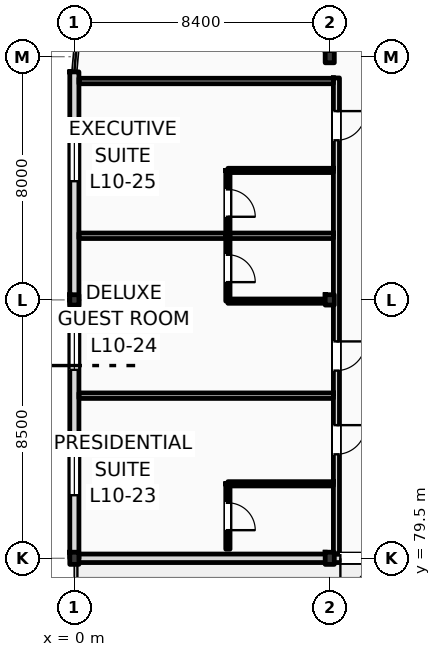
"""IFC4 building model, lengths in metres.
Left out: names, types, materials, properties, quantities, classifications, styles, units other than length and angle.
Written with IfcOpenShell. Run it as: python <this file> out.ifc"""

import sys

from ifc_helpers import new_model, si_unit, direction, frame, frame_2d, origin, origin_2d, place, context, subcontext, project, spatial, rectangle, i_section, extrude, element, fill, save


model = new_model("IFC4")
c1 = context("Model", 3, precision=1e-05, world=origin(), true_north=direction((0.0, 1.0)))
c2 = subcontext(c1, "Body", "Model", "MODEL_VIEW")
j1 = project(units=[si_unit("LENGTHUNIT", "METRE"), si_unit("PLANEANGLEUNIT", "RADIAN")], contexts=[c1])
p1 = place(None, origin())
s1 = spatial("IfcSite", under=j1, at=p1, CompositionType="ELEMENT")
p2 = place(p1, origin())
s2 = spatial("IfcBuilding", under=s1, at=p2, CompositionType="ELEMENT")
p3 = place(p2, frame((0.0, 0.0, 42.6)))
s3 = spatial("IfcBuildingStorey", under=s2, at=p3, CompositionType="ELEMENT", Elevation=42.6)
p4 = place(p3, frame((0.0, 79.5, 0.0), z_axis=(0.0, 0.0, 1.0), x_axis=(1.0, 0.0, 0.0)))
e1 = element("IfcColumn", 1, at=p4, inside=s3, PredefinedType="COLUMN", context=c2, shape_type="SweptSolid", body=[
    extrude(i_section(OverallWidth=0.3, OverallDepth=0.4, WebThickness=0.013, FlangeThickness=0.024, FilletRadius=0.027, at=origin_2d()), origin(), (0.0, 0.0, 1.0), 4.2),
])
p5 = place(p3, frame((0.0, 88.0, 0.0), z_axis=(0.0, 0.0, 1.0), x_axis=(1.0, 0.0, 0.0)))
e2 = element("IfcColumn", 2, at=p5, inside=s3, PredefinedType="COLUMN", context=c2, shape_type="SweptSolid", body=[
    extrude(i_section(OverallWidth=0.3, OverallDepth=0.34, WebThickness=0.012, FlangeThickness=0.021, FilletRadius=0.027, at=origin_2d()), origin(), (0.0, 0.0, 1.0), 4.2),
])
p6 = place(p3, frame((8.4, 79.5, 0.0), z_axis=(0.0, 0.0, 1.0), x_axis=(1.0, 0.0, 0.0)))
e3 = element("IfcColumn", 3, at=p6, inside=s3, PredefinedType="COLUMN", context=c2, shape_type="SweptSolid", body=[
    extrude(i_section(OverallWidth=0.3, OverallDepth=0.4, WebThickness=0.013, FlangeThickness=0.024, FilletRadius=0.027, at=origin_2d()), origin(), (0.0, 0.0, 1.0), 4.2),
])
p7 = place(p3, frame((8.4, 88.0, 0.0), z_axis=(0.0, 0.0, 1.0), x_axis=(1.0, 0.0, 0.0)))
e4 = element("IfcColumn", 4, at=p7, inside=s3, PredefinedType="COLUMN", context=c2, shape_type="SweptSolid", body=[
    extrude(i_section(OverallWidth=0.3, OverallDepth=0.34, WebThickness=0.012, FlangeThickness=0.021, FilletRadius=0.027, at=origin_2d()), origin(), (0.0, 0.0, 1.0), 4.2),
])
p8 = place(p3, frame((8.4, 96.0, 0.0), z_axis=(0.0, 0.0, 1.0), x_axis=(1.0, 0.0, 0.0)))
e5 = element("IfcColumn", 5, at=p8, inside=s3, PredefinedType="COLUMN", context=c2, shape_type="SweptSolid", body=[
    extrude(i_section(OverallWidth=0.3, OverallDepth=0.4, WebThickness=0.013, FlangeThickness=0.024, FilletRadius=0.027, at=origin_2d()), origin(), (0.0, 0.0, 1.0), 4.2),
])
p9 = place(p3, frame((0.0, 79.5, 0.0), z_axis=(0.0, 0.0, 1.0), x_axis=(0.0, 1.0, 0.0)))
e6 = element("IfcWall", 6, at=p9, inside=s3, PredefinedType="STANDARD", context=c2, shape_type="SweptSolid", body=[
    extrude(rectangle(XDim=8.5, YDim=0.3, at=frame_2d((4.25, 0.0))), origin(), (0.0, 0.0, 1.0), 3.57),
])
p10 = place(p9, frame((2.075, 0.0, 0.9)))
e7 = element("IfcOpeningElement", 7, at=p10, cuts=e6, PredefinedType="OPENING", context=c2, shape_type="SweptSolid", body=[
    extrude(rectangle(XDim=1.5, YDim=2.49, at=frame_2d((0.75, 1.245))), frame((0.0, 0.16, 0.0), z_axis=(0.0, -1.0, 0.0), x_axis=(1.0, 0.0, 0.0)), (0.0, 0.0, 1.0), 0.32),
])
p11 = place(p9, frame((6.2, 0.0, 0.9)))
e8 = element("IfcOpeningElement", 8, at=p11, cuts=e6, PredefinedType="OPENING", context=c2, shape_type="SweptSolid", body=[
    extrude(rectangle(XDim=1.5, YDim=2.49, at=frame_2d((0.75, 1.245))), frame((0.0, 0.16, 0.0), z_axis=(0.0, -1.0, 0.0), x_axis=(1.0, 0.0, 0.0)), (0.0, 0.0, 1.0), 0.32),
])
p12 = place(p3, frame((0.0, 88.0, 0.0), z_axis=(0.0, 0.0, 1.0), x_axis=(0.0, 1.0, 0.0)))
e9 = element("IfcWall", 9, at=p12, inside=s3, PredefinedType="STANDARD", context=c2, shape_type="SweptSolid", body=[
    extrude(rectangle(XDim=7.5, YDim=0.3, at=frame_2d((3.75, 0.0))), origin(), (0.0, 0.0, 1.0), 3.94),
])
p13 = place(p12, frame((3.904, 0.0, 0.9)))
e10 = element("IfcOpeningElement", 10, at=p13, cuts=e9, PredefinedType="OPENING", context=c2, shape_type="SweptSolid", body=[
    extrude(rectangle(XDim=1.5, YDim=2.86, at=frame_2d((0.75, 1.43))), frame((0.0, 0.16, 0.0), z_axis=(0.0, -1.0, 0.0), x_axis=(1.0, 0.0, 0.0)), (0.0, 0.0, 1.0), 0.32),
])
p14 = place(p3, frame((0.0, 79.5, 0.0), z_axis=(0.0, 0.0, 1.0), x_axis=(1.0, 0.0, 0.0)))
e11 = element("IfcWall", 11, at=p14, inside=s3, PredefinedType="STANDARD", context=c2, shape_type="SweptSolid", body=[
    extrude(rectangle(XDim=25.2, YDim=0.28, at=frame_2d((12.6, 0.0))), origin(), (0.0, 0.0, 1.0), 3.38),
])
p15 = place(p14, frame((8.75, 0.0, 0.0)))
e12 = element("IfcOpeningElement", 12, at=p15, cuts=e11, PredefinedType="OPENING", context=c2, shape_type="SweptSolid", body=[
    extrude(rectangle(XDim=1.8, YDim=2.4, at=frame_2d((0.9, 1.2))), frame((0.0, 0.15, 0.0), z_axis=(0.0, -1.0, 0.0), x_axis=(1.0, 0.0, 0.0)), (0.0, 0.0, 1.0), 0.3),
])
p16 = place(p3, frame((8.62, 79.64, 0.0), z_axis=(0.0, 0.0, 1.0), x_axis=(0.0, 1.0, 0.0)))
e13 = element("IfcWall", 13, at=p16, inside=s3, PredefinedType="PARTITIONING", context=c2, shape_type="SweptSolid", body=[
    extrude(rectangle(XDim=15.66, YDim=0.2, at=frame_2d((7.83, 0.0))), origin(), (0.0, 0.0, 1.0), 3.57),
])
p17 = place(p16, frame((3.28, 0.0, 0.0)))
e14 = element("IfcOpeningElement", 14, at=p17, cuts=e13, PredefinedType="OPENING", context=c2, shape_type="SweptSolid", body=[
    extrude(rectangle(XDim=0.96, YDim=2.2, at=frame_2d((0.48, 1.1))), frame((0.0, 0.11, 0.0), z_axis=(0.0, -1.0, 0.0), x_axis=(1.0, 0.0, 0.0)), (0.0, 0.0, 1.0), 0.22),
])
p18 = place(p16, frame((6.034, 0.0, 0.0)))
e15 = element("IfcOpeningElement", 15, at=p18, cuts=e13, PredefinedType="OPENING", context=c2, shape_type="SweptSolid", body=[
    extrude(rectangle(XDim=0.96, YDim=2.2, at=frame_2d((0.48, 1.1))), frame((0.0, 0.11, 0.0), z_axis=(0.0, -1.0, 0.0), x_axis=(1.0, 0.0, 0.0)), (0.0, 0.0, 1.0), 0.22),
])
p19 = place(p16, frame((13.61, 0.0, 0.0)))
e16 = element("IfcOpeningElement", 16, at=p19, cuts=e13, PredefinedType="OPENING", context=c2, shape_type="SweptSolid", body=[
    extrude(rectangle(XDim=0.96, YDim=2.2, at=frame_2d((0.48, 1.1))), frame((0.0, 0.11, 0.0), z_axis=(0.0, -1.0, 0.0), x_axis=(1.0, 0.0, 0.0)), (0.0, 0.0, 1.0), 0.22),
])
p20 = place(p3, frame((0.15, 84.849, 0.0), z_axis=(0.0, 0.0, 1.0), x_axis=(1.0, 0.0, 0.0)))
e17 = element("IfcWall", 17, at=p20, inside=s3, PredefinedType="PARTITIONING", context=c2, shape_type="SweptSolid", body=[
    extrude(rectangle(XDim=8.37, YDim=0.18, at=frame_2d((4.185, 0.0))), origin(), (0.0, 0.0, 1.0), 3.94),
])
p21 = place(p3, frame((5.05, 81.95, 0.0), z_axis=(0.0, 0.0, 1.0), x_axis=(1.0, 0.0, 0.0)))
e18 = element("IfcWall", 18, at=p21, inside=s3, PredefinedType="PARTITIONING", context=c2, shape_type="SweptSolid", body=[
    extrude(rectangle(XDim=3.47, YDim=0.14, at=frame_2d((1.735, 0.0))), origin(), (0.0, 0.0, 1.0), 3.94),
])
p22 = place(p3, frame((5.05, 79.8, 0.0), z_axis=(0.0, 0.0, 1.0), x_axis=(0.0, 1.0, 0.0)))
e19 = element("IfcWall", 19, at=p22, inside=s3, PredefinedType="PARTITIONING", context=c2, shape_type="SweptSolid", body=[
    extrude(rectangle(XDim=2.15, YDim=0.14, at=frame_2d((1.075, 0.0))), origin(), (0.0, 0.0, 1.0), 3.94),
])
p23 = place(p22, frame((0.625, 0.0, 0.0)))
e20 = element("IfcOpeningElement", 20, at=p23, cuts=e19, PredefinedType="OPENING", context=c2, shape_type="SweptSolid", body=[
    extrude(rectangle(XDim=0.9, YDim=2.1, at=frame_2d((0.45, 1.05))), frame((0.0, 0.08, 0.0), z_axis=(0.0, -1.0, 0.0), x_axis=(1.0, 0.0, 0.0)), (0.0, 0.0, 1.0), 0.16),
])
p24 = place(p3, frame((0.15, 90.109, 0.0), z_axis=(0.0, 0.0, 1.0), x_axis=(1.0, 0.0, 0.0)))
e21 = element("IfcWall", 21, at=p24, inside=s3, PredefinedType="PARTITIONING", context=c2, shape_type="SweptSolid", body=[
    extrude(rectangle(XDim=8.37, YDim=0.18, at=frame_2d((4.185, 0.0))), origin(), (0.0, 0.0, 1.0), 3.94),
])
p25 = place(p3, frame((5.05, 87.959, 0.0), z_axis=(0.0, 0.0, 1.0), x_axis=(1.0, 0.0, 0.0)))
e22 = element("IfcWall", 22, at=p25, inside=s3, PredefinedType="PARTITIONING", context=c2, shape_type="SweptSolid", body=[
    extrude(rectangle(XDim=3.47, YDim=0.14, at=frame_2d((1.735, 0.0))), origin(), (0.0, 0.0, 1.0), 3.38),
])
p26 = place(p3, frame((5.05, 87.959, 0.0), z_axis=(0.0, 0.0, 1.0), x_axis=(0.0, 1.0, 0.0)))
e23 = element("IfcWall", 23, at=p26, inside=s3, PredefinedType="PARTITIONING", context=c2, shape_type="SweptSolid", body=[
    extrude(rectangle(XDim=2.15, YDim=0.14, at=frame_2d((1.075, 0.0))), origin(), (0.0, 0.0, 1.0), 3.94),
])
p27 = place(p26, frame((0.625, 0.0, 0.0)))
e24 = element("IfcOpeningElement", 24, at=p27, cuts=e23, PredefinedType="OPENING", context=c2, shape_type="SweptSolid", body=[
    extrude(rectangle(XDim=0.9, YDim=2.1, at=frame_2d((0.45, 1.05))), frame((0.0, 0.08, 0.0), z_axis=(0.0, -1.0, 0.0), x_axis=(1.0, 0.0, 0.0)), (0.0, 0.0, 1.0), 0.16),
])
p28 = place(p3, frame((0.15, 95.2, 0.0), z_axis=(0.0, 0.0, 1.0), x_axis=(1.0, 0.0, 0.0)))
e25 = element("IfcWall", 25, at=p28, inside=s3, PredefinedType="PARTITIONING", context=c2, shape_type="SweptSolid", body=[
    extrude(rectangle(XDim=8.37, YDim=0.18, at=frame_2d((4.185, 0.0))), origin(), (0.0, 0.0, 1.0), 3.94),
])
p29 = place(p3, frame((5.05, 92.259, 0.0), z_axis=(0.0, 0.0, 1.0), x_axis=(1.0, 0.0, 0.0)))
e26 = element("IfcWall", 26, at=p29, inside=s3, PredefinedType="PARTITIONING", context=c2, shape_type="SweptSolid", body=[
    extrude(rectangle(XDim=3.47, YDim=0.14, at=frame_2d((1.735, 0.0))), origin(), (0.0, 0.0, 1.0), 3.94),
])
p30 = place(p3, frame((5.05, 90.109, 0.0), z_axis=(0.0, 0.0, 1.0), x_axis=(0.0, 1.0, 0.0)))
e27 = element("IfcWall", 27, at=p30, inside=s3, PredefinedType="PARTITIONING", context=c2, shape_type="SweptSolid", body=[
    extrude(rectangle(XDim=2.15, YDim=0.14, at=frame_2d((1.075, 0.0))), origin(), (0.0, 0.0, 1.0), 3.94),
])
p31 = place(p30, frame((0.625, 0.0, 0.0)))
e28 = element("IfcOpeningElement", 28, at=p31, cuts=e27, PredefinedType="OPENING", context=c2, shape_type="SweptSolid", body=[
    extrude(rectangle(XDim=0.9, YDim=2.1, at=frame_2d((0.45, 1.05))), frame((0.0, 0.08, 0.0), z_axis=(0.0, -1.0, 0.0), x_axis=(1.0, 0.0, 0.0)), (0.0, 0.0, 1.0), 0.16),
])
p32 = place(p15, frame((1.8, 0.0, 0.0), z_axis=(0.0, 0.0, 1.0), x_axis=(-1.0, 0.0, 0.0)))
e29 = element("IfcDoor", 29, at=p32, inside=s3, OperationType="DOUBLE_SWING_LEFT", PredefinedType="DOOR", context=c2, shape_type="SweptSolid", body=[
    extrude(rectangle(XDim=1.8, YDim=2.4, at=frame_2d((0.9, 1.2))), frame((0.0, 0.025, 0.0), z_axis=(0.0, -1.0, 0.0), x_axis=(1.0, 0.0, 0.0)), (0.0, 0.0, 1.0), 0.05),
])
fill(e12, e29)
p33 = place(p10, origin())
e30 = element("IfcWindow", 30, at=p33, inside=s3, PartitioningType="DOUBLE_PANEL_VERTICAL", PredefinedType="WINDOW", context=c2, shape_type="SweptSolid", body=[
    extrude(rectangle(XDim=1.5, YDim=2.49, at=frame_2d((0.75, 1.245))), frame((0.0, 0.03, 0.0), z_axis=(0.0, -1.0, 0.0), x_axis=(1.0, 0.0, 0.0)), (0.0, 0.0, 1.0), 0.06),
])
fill(e7, e30)
p34 = place(p11, origin())
e31 = element("IfcWindow", 31, at=p34, inside=s3, PartitioningType="DOUBLE_PANEL_VERTICAL", PredefinedType="WINDOW", context=c2, shape_type="SweptSolid", body=[
    extrude(rectangle(XDim=1.5, YDim=2.49, at=frame_2d((0.75, 1.245))), frame((0.0, 0.03, 0.0), z_axis=(0.0, -1.0, 0.0), x_axis=(1.0, 0.0, 0.0)), (0.0, 0.0, 1.0), 0.06),
])
fill(e8, e31)
p35 = place(p13, origin())
e32 = element("IfcWindow", 32, at=p35, inside=s3, PartitioningType="DOUBLE_PANEL_VERTICAL", PredefinedType="WINDOW", context=c2, shape_type="SweptSolid", body=[
    extrude(rectangle(XDim=1.5, YDim=2.86, at=frame_2d((0.75, 1.43))), frame((0.0, 0.03, 0.0), z_axis=(0.0, -1.0, 0.0), x_axis=(1.0, 0.0, 0.0)), (0.0, 0.0, 1.0), 0.06),
])
fill(e10, e32)
p36 = place(p17, frame((0.96, 0.0, 0.0), z_axis=(0.0, 0.0, 1.0), x_axis=(-1.0, 0.0, 0.0)))
e33 = element("IfcDoor", 33, at=p36, inside=s3, OperationType="SINGLE_SWING_RIGHT", PredefinedType="DOOR", context=c2, shape_type="SweptSolid", body=[
    extrude(rectangle(XDim=0.96, YDim=2.2, at=frame_2d((0.48, 1.1))), frame((0.0, 0.025, 0.0), z_axis=(0.0, -1.0, 0.0), x_axis=(1.0, 0.0, 0.0)), (0.0, 0.0, 1.0), 0.05),
])
fill(e14, e33)
p37 = place(p23, frame((0.9, 0.0, 0.0), z_axis=(0.0, 0.0, 1.0), x_axis=(-1.0, 0.0, 0.0)))
e34 = element("IfcDoor", 34, at=p37, inside=s3, OperationType="SINGLE_SWING_LEFT", PredefinedType="DOOR", context=c2, shape_type="SweptSolid", body=[
    extrude(rectangle(XDim=0.9, YDim=2.1, at=frame_2d((0.45, 1.05))), frame((0.0, 0.025, 0.0), z_axis=(0.0, -1.0, 0.0), x_axis=(1.0, 0.0, 0.0)), (0.0, 0.0, 1.0), 0.05),
])
fill(e20, e34)
p38 = place(p18, frame((0.96, 0.0, 0.0), z_axis=(0.0, 0.0, 1.0), x_axis=(-1.0, 0.0, 0.0)))
e35 = element("IfcDoor", 35, at=p38, inside=s3, OperationType="SINGLE_SWING_RIGHT", PredefinedType="DOOR", context=c2, shape_type="SweptSolid", body=[
    extrude(rectangle(XDim=0.96, YDim=2.2, at=frame_2d((0.48, 1.1))), frame((0.0, 0.025, 0.0), z_axis=(0.0, -1.0, 0.0), x_axis=(1.0, 0.0, 0.0)), (0.0, 0.0, 1.0), 0.05),
])
fill(e15, e35)
p39 = place(p27, frame((0.9, 0.0, 0.0), z_axis=(0.0, 0.0, 1.0), x_axis=(-1.0, 0.0, 0.0)))
e36 = element("IfcDoor", 36, at=p39, inside=s3, OperationType="SINGLE_SWING_LEFT", PredefinedType="DOOR", context=c2, shape_type="SweptSolid", body=[
    extrude(rectangle(XDim=0.9, YDim=2.1, at=frame_2d((0.45, 1.05))), frame((0.0, 0.025, 0.0), z_axis=(0.0, -1.0, 0.0), x_axis=(1.0, 0.0, 0.0)), (0.0, 0.0, 1.0), 0.05),
])
fill(e24, e36)
p40 = place(p19, frame((0.96, 0.0, 0.0), z_axis=(0.0, 0.0, 1.0), x_axis=(-1.0, 0.0, 0.0)))
e37 = element("IfcDoor", 37, at=p40, inside=s3, OperationType="SINGLE_SWING_RIGHT", PredefinedType="DOOR", context=c2, shape_type="SweptSolid", body=[
    extrude(rectangle(XDim=0.96, YDim=2.2, at=frame_2d((0.48, 1.1))), frame((0.0, 0.025, 0.0), z_axis=(0.0, -1.0, 0.0), x_axis=(1.0, 0.0, 0.0)), (0.0, 0.0, 1.0), 0.05),
])
fill(e16, e37)
p41 = place(p31, frame((0.9, 0.0, 0.0), z_axis=(0.0, 0.0, 1.0), x_axis=(-1.0, 0.0, 0.0)))
e38 = element("IfcDoor", 38, at=p41, inside=s3, OperationType="SINGLE_SWING_LEFT", PredefinedType="DOOR", context=c2, shape_type="SweptSolid", body=[
    extrude(rectangle(XDim=0.9, YDim=2.1, at=frame_2d((0.45, 1.05))), frame((0.0, 0.025, 0.0), z_axis=(0.0, -1.0, 0.0), x_axis=(1.0, 0.0, 0.0)), (0.0, 0.0, 1.0), 0.05),
])
fill(e28, e38)
save(model, sys.argv[1])
